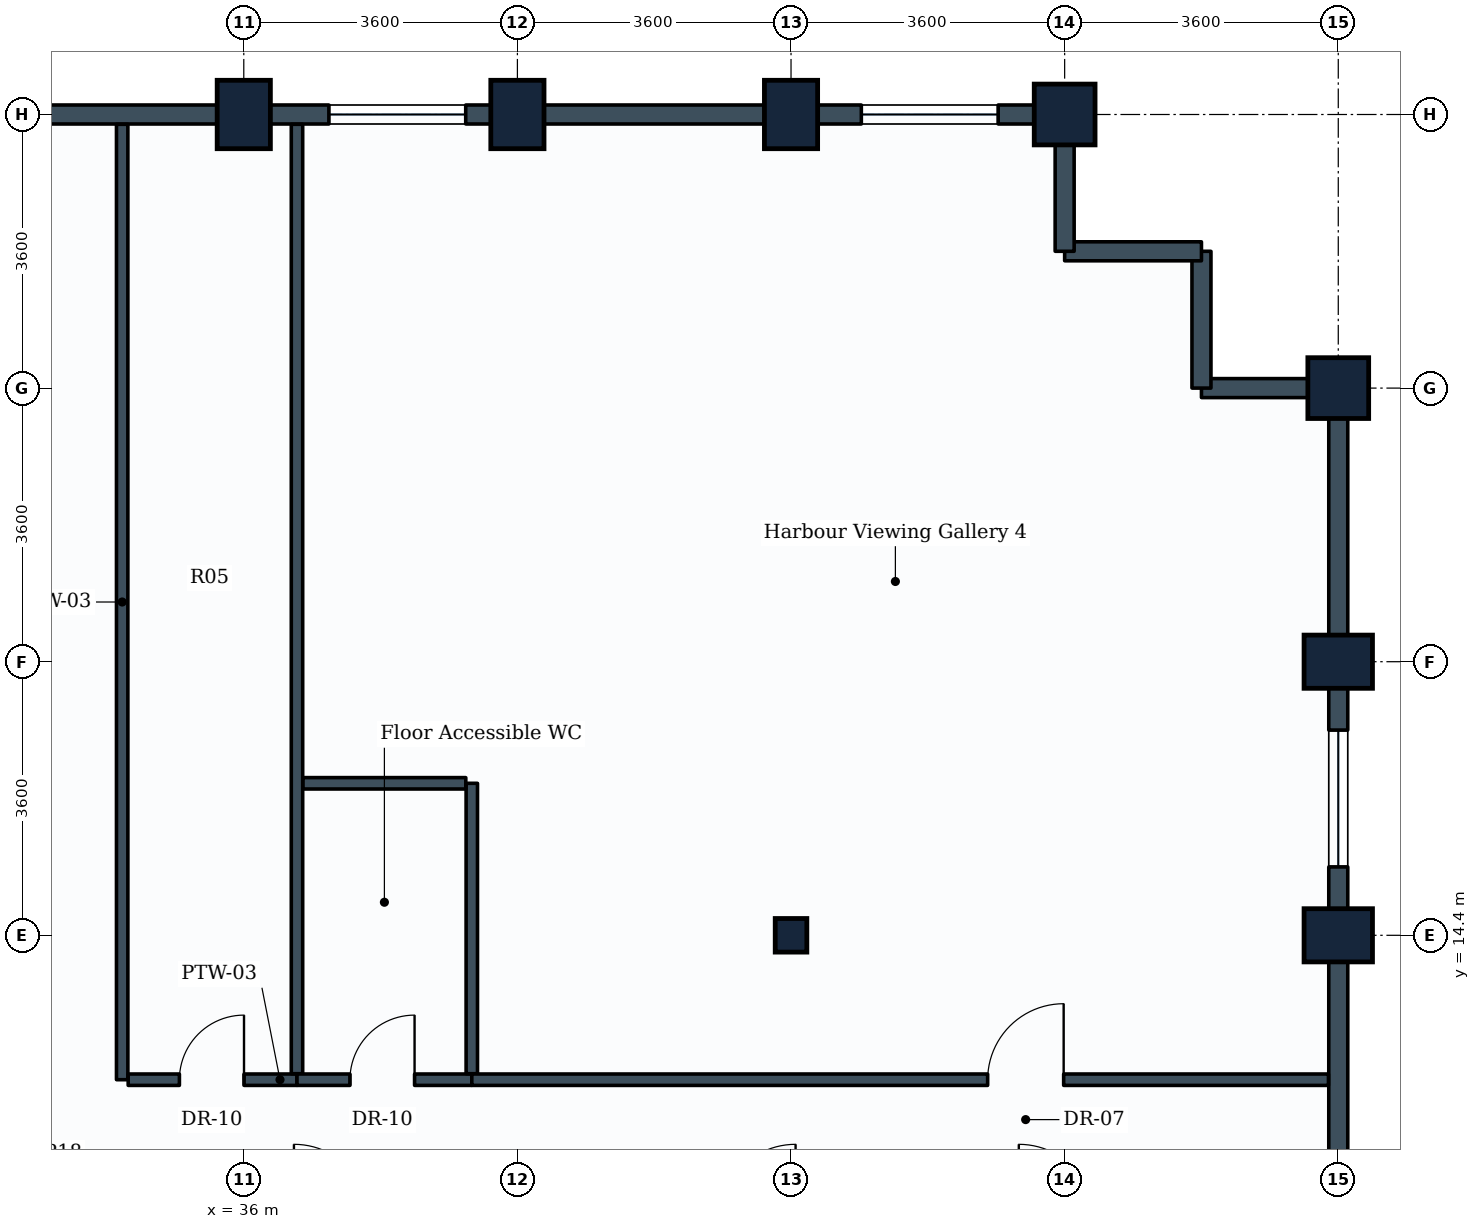
"""IFC4 building model, lengths in metres.
Left out: names, types, materials, properties, quantities, classifications, styles, units other than length and angle.
Written with IfcOpenShell. Run it as: python <this file> out.ifc"""

import sys

from ifc_helpers import new_model, si_unit, direction, frame, frame_2d, origin, origin_2d, place, context, subcontext, project, spatial, rectangle, i_section, extrude, element, fill, save


model = new_model("IFC4")
c1 = context("Model", 3, precision=1e-05, world=origin(), true_north=direction((0.0, 1.0)))
c2 = subcontext(c1, "Body", "Model", "MODEL_VIEW")
j1 = project(units=[si_unit("LENGTHUNIT", "METRE"), si_unit("PLANEANGLEUNIT", "RADIAN")], contexts=[c1])
p1 = place(None, origin())
s1 = spatial("IfcSite", under=j1, at=p1, CompositionType="ELEMENT")
p2 = place(p1, origin())
s2 = spatial("IfcBuilding", under=s1, at=p2, CompositionType="ELEMENT")
p3 = place(p2, frame((0.0, 0.0, 205.2)))
s3 = spatial("IfcBuildingStorey", under=s2, at=p3, CompositionType="ELEMENT", Elevation=205.2)
for number, where, z_axis, x_axis in (
    (1, (36.0, 25.2, 0.0), (0.0, 0.0, 1.0), (1.0, 0.0, 0.0)),
    (2, (39.6, 25.2, 0.0), (0.0, 0.0, 1.0), (1.0, 0.0, 0.0)),
):
    element("IfcColumn", number, at=place(p3, frame(where, z_axis=z_axis, x_axis=x_axis)), inside=s3, PredefinedType="COLUMN", context=c2, shape_type="SweptSolid", body=[
        extrude(rectangle(XDim=0.7, YDim=0.9, at=origin_2d()), origin(), (0.0, 0.0, 1.0), 3.8),
    ])
p4 = place(p3, frame((43.2, 14.4, 0.0), z_axis=(0.0, 0.0, 1.0), x_axis=(1.0, 0.0, 0.0)))
e3 = element("IfcColumn", 3, at=p4, inside=s3, PredefinedType="COLUMN", context=c2, shape_type="SweptSolid", body=[
    extrude(i_section(OverallWidth=0.416, OverallDepth=0.442, WebThickness=0.025, FlangeThickness=0.041, FilletRadius=0.015, at=origin_2d()), origin(), (0.0, 0.0, 1.0), 3.8),
])
p5 = place(p3, frame((43.2, 25.2, 0.0), z_axis=(0.0, 0.0, 1.0), x_axis=(1.0, 0.0, 0.0)))
e4 = element("IfcColumn", 4, at=p5, inside=s3, PredefinedType="COLUMN", context=c2, shape_type="SweptSolid", body=[
    extrude(rectangle(XDim=0.7, YDim=0.9, at=origin_2d()), origin(), (0.0, 0.0, 1.0), 3.8),
])
p6 = place(p3, frame((46.8, 25.2, 0.0), z_axis=(0.0, 0.0, 1.0), x_axis=(1.0, 0.0, 0.0)))
e5 = element("IfcColumn", 5, at=p6, inside=s3, PredefinedType="COLUMN", context=c2, shape_type="SweptSolid", body=[
    extrude(rectangle(XDim=0.8, YDim=0.8, at=origin_2d()), origin(), (0.0, 0.0, 1.0), 3.8),
])
for number, where, z_axis, x_axis in (
    (6, (50.4, 14.4, 0.0), (0.0, 0.0, 1.0), (0.0, 1.0, 0.0)),
    (7, (50.4, 18.0, 0.0), (0.0, 0.0, 1.0), (0.0, 1.0, 0.0)),
):
    element("IfcColumn", number, at=place(p3, frame(where, z_axis=z_axis, x_axis=x_axis)), inside=s3, PredefinedType="COLUMN", context=c2, shape_type="SweptSolid", body=[
        extrude(rectangle(XDim=0.7, YDim=0.9, at=origin_2d()), origin(), (0.0, 0.0, 1.0), 3.8),
    ])
p7 = place(p3, frame((50.4, 21.6, 0.0), z_axis=(0.0, 0.0, 1.0), x_axis=(0.0, 1.0, 0.0)))
e8 = element("IfcColumn", 8, at=p7, inside=s3, PredefinedType="COLUMN", context=c2, shape_type="SweptSolid", body=[
    extrude(rectangle(XDim=0.8, YDim=0.8, at=origin_2d()), origin(), (0.0, 0.0, 1.0), 3.8),
])
p8 = place(p3, frame((50.4, 14.4, 0.0), z_axis=(0.0, 0.0, 1.0), x_axis=(0.0, -1.0, 0.0)))
e9 = element("IfcWall", 9, at=p8, inside=s3, PredefinedType="STANDARD", context=c2, shape_type="SweptSolid", body=[
    extrude(rectangle(XDim=3.6, YDim=0.25, at=frame_2d((1.8, 0.0))), origin(), (0.0, 0.0, 1.0), 2.93),
])
p9 = place(p3, frame((50.4, 18.0, 0.0), z_axis=(0.0, 0.0, 1.0), x_axis=(0.0, -1.0, 0.0)))
e10 = element("IfcWall", 10, at=p9, inside=s3, PredefinedType="STANDARD", context=c2, shape_type="SweptSolid", body=[
    extrude(rectangle(XDim=3.6, YDim=0.25, at=frame_2d((1.8, 0.0))), origin(), (0.0, 0.0, 1.0), 2.93),
])
p10 = place(p9, frame((0.9, 0.0, 0.85)))
e11 = element("IfcOpeningElement", 11, at=p10, cuts=e10, PredefinedType="OPENING", context=c2, shape_type="SweptSolid", body=[
    extrude(rectangle(XDim=1.8, YDim=1.35, at=frame_2d((0.9, 0.675))), frame((0.0, 0.135, 0.0), z_axis=(0.0, -1.0, 0.0), x_axis=(1.0, 0.0, 0.0)), (0.0, 0.0, 1.0), 0.27),
])
p11 = place(p3, frame((50.4, 21.6, 0.0), z_axis=(0.0, 0.0, 1.0), x_axis=(0.0, -1.0, 0.0)))
e12 = element("IfcWall", 12, at=p11, inside=s3, PredefinedType="STANDARD", context=c2, shape_type="SweptSolid", body=[
    extrude(rectangle(XDim=3.6, YDim=0.25, at=frame_2d((1.8, 0.0))), origin(), (0.0, 0.0, 1.0), 2.93),
])
p12 = place(p3, frame((48.6, 21.6, 0.0), z_axis=(0.0, 0.0, 1.0), x_axis=(1.0, 0.0, 0.0)))
e13 = element("IfcWall", 13, at=p12, inside=s3, PredefinedType="STANDARD", context=c2, shape_type="SweptSolid", body=[
    extrude(rectangle(XDim=1.8, YDim=0.25, at=frame_2d((0.9, 0.0))), origin(), (0.0, 0.0, 1.0), 2.93),
])
p13 = place(p3, frame((48.6, 23.4, 0.0), z_axis=(0.0, 0.0, 1.0), x_axis=(0.0, -1.0, 0.0)))
e14 = element("IfcWall", 14, at=p13, inside=s3, PredefinedType="STANDARD", context=c2, shape_type="SweptSolid", body=[
    extrude(rectangle(XDim=1.8, YDim=0.25, at=frame_2d((0.9, 0.0))), origin(), (0.0, 0.0, 1.0), 3.465),
])
p14 = place(p3, frame((46.8, 23.4, 0.0), z_axis=(0.0, 0.0, 1.0), x_axis=(1.0, 0.0, 0.0)))
e15 = element("IfcWall", 15, at=p14, inside=s3, PredefinedType="STANDARD", context=c2, shape_type="SweptSolid", body=[
    extrude(rectangle(XDim=1.8, YDim=0.25, at=frame_2d((0.9, 0.0))), origin(), (0.0, 0.0, 1.0), 3.465),
])
p15 = place(p3, frame((46.8, 25.2, 0.0), z_axis=(0.0, 0.0, 1.0), x_axis=(0.0, -1.0, 0.0)))
e16 = element("IfcWall", 16, at=p15, inside=s3, PredefinedType="STANDARD", context=c2, shape_type="SweptSolid", body=[
    extrude(rectangle(XDim=1.8, YDim=0.25, at=frame_2d((0.9, 0.0))), origin(), (0.0, 0.0, 1.0), 2.93),
])
p16 = place(p3, frame((43.2, 25.2, 0.0), z_axis=(0.0, 0.0, 1.0), x_axis=(1.0, 0.0, 0.0)))
e17 = element("IfcWall", 17, at=p16, inside=s3, PredefinedType="STANDARD", context=c2, shape_type="SweptSolid", body=[
    extrude(rectangle(XDim=3.6, YDim=0.25, at=frame_2d((1.8, 0.0))), origin(), (0.0, 0.0, 1.0), 2.93),
])
p17 = place(p16, frame((0.925, 0.0, 0.85)))
e18 = element("IfcOpeningElement", 18, at=p17, cuts=e17, PredefinedType="OPENING", context=c2, shape_type="SweptSolid", body=[
    extrude(rectangle(XDim=1.8, YDim=1.35, at=frame_2d((0.9, 0.675))), frame((0.0, 0.135, 0.0), z_axis=(0.0, -1.0, 0.0), x_axis=(1.0, 0.0, 0.0)), (0.0, 0.0, 1.0), 0.27),
])
p18 = place(p3, frame((39.6, 25.2, 0.0), z_axis=(0.0, 0.0, 1.0), x_axis=(1.0, 0.0, 0.0)))
e19 = element("IfcWall", 19, at=p18, inside=s3, PredefinedType="STANDARD", context=c2, shape_type="SweptSolid", body=[
    extrude(rectangle(XDim=3.6, YDim=0.25, at=frame_2d((1.8, 0.0))), origin(), (0.0, 0.0, 1.0), 2.93),
])
p19 = place(p3, frame((36.0, 25.2, 0.0), z_axis=(0.0, 0.0, 1.0), x_axis=(1.0, 0.0, 0.0)))
e20 = element("IfcWall", 20, at=p19, inside=s3, PredefinedType="STANDARD", context=c2, shape_type="SweptSolid", body=[
    extrude(rectangle(XDim=3.6, YDim=0.25, at=frame_2d((1.8, 0.0))), origin(), (0.0, 0.0, 1.0), 2.93),
])
p20 = place(p19, frame((1.12, 0.0, 0.85)))
e21 = element("IfcOpeningElement", 21, at=p20, cuts=e20, PredefinedType="OPENING", context=c2, shape_type="SweptSolid", body=[
    extrude(rectangle(XDim=1.8, YDim=1.35, at=frame_2d((0.9, 0.675))), frame((0.0, 0.135, 0.0), z_axis=(0.0, -1.0, 0.0), x_axis=(1.0, 0.0, 0.0)), (0.0, 0.0, 1.0), 0.27),
])
p21 = place(p3, frame((32.4, 25.2, 0.0), z_axis=(0.0, 0.0, 1.0), x_axis=(1.0, 0.0, 0.0)))
e22 = element("IfcWall", 22, at=p21, inside=s3, PredefinedType="STANDARD", context=c2, shape_type="SweptSolid", body=[
    extrude(rectangle(XDim=3.6, YDim=0.25, at=frame_2d((1.8, 0.0))), origin(), (0.0, 0.0, 1.0), 2.93),
])
p22 = place(p3, frame((34.4, 12.5, 0.0), z_axis=(0.0, 0.0, 1.0), x_axis=(0.0, 1.0, 0.0)))
e23 = element("IfcWall", 23, at=p22, inside=s3, PredefinedType="PARTITIONING", context=c2, shape_type="SweptSolid", body=[
    extrude(rectangle(XDim=12.571, YDim=0.15, at=frame_2d((6.286, 0.0))), origin(), (0.0, 0.0, 1.0), 2.93),
])
p23 = place(p3, frame((34.479, 12.5, 0.0), z_axis=(0.0, 0.0, 1.0), x_axis=(1.0, 0.0, 0.0)))
e24 = element("IfcWall", 24, at=p23, inside=s3, PredefinedType="PARTITIONING", context=c2, shape_type="SweptSolid", body=[
    extrude(rectangle(XDim=2.221, YDim=0.15, at=frame_2d((1.11, 0.0))), origin(), (0.0, 0.0, 1.0), 3.19),
])
p24 = place(p23, frame((0.674, 0.0, 0.0)))
e25 = element("IfcOpeningElement", 25, at=p24, cuts=e24, PredefinedType="OPENING", context=c2, shape_type="SweptSolid", body=[
    extrude(rectangle(XDim=0.85, YDim=2.1, at=frame_2d((0.425, 1.05))), frame((0.0, 0.085, 0.0), z_axis=(0.0, -1.0, 0.0), x_axis=(1.0, 0.0, 0.0)), (0.0, 0.0, 1.0), 0.17),
])
p25 = place(p3, frame((36.7, 12.579, 0.0), z_axis=(0.0, 0.0, 1.0), x_axis=(0.0, 1.0, 0.0)))
e26 = element("IfcWall", 26, at=p25, inside=s3, PredefinedType="PARTITIONING", context=c2, shape_type="SweptSolid", body=[
    extrude(rectangle(XDim=12.492, YDim=0.15, at=frame_2d((6.246, 0.0))), origin(), (0.0, 0.0, 1.0), 2.93),
])
p26 = place(p3, frame((36.7, 12.5, 0.0), z_axis=(0.0, 0.0, 1.0), x_axis=(1.0, 0.0, 0.0)))
e27 = element("IfcWall", 27, at=p26, inside=s3, PredefinedType="PARTITIONING", context=c2, shape_type="SweptSolid", body=[
    extrude(rectangle(XDim=2.3, YDim=0.15, at=frame_2d((1.15, 0.0))), origin(), (0.0, 0.0, 1.0), 3.465),
])
p27 = place(p26, frame((0.697, 0.0, 0.0)))
e28 = element("IfcOpeningElement", 28, at=p27, cuts=e27, PredefinedType="OPENING", context=c2, shape_type="SweptSolid", body=[
    extrude(rectangle(XDim=0.85, YDim=2.1, at=frame_2d((0.425, 1.05))), frame((0.0, 0.085, 0.0), z_axis=(0.0, -1.0, 0.0), x_axis=(1.0, 0.0, 0.0)), (0.0, 0.0, 1.0), 0.17),
])
p28 = place(p3, frame((39.0, 12.579, 0.0), z_axis=(0.0, 0.0, 1.0), x_axis=(0.0, 1.0, 0.0)))
e29 = element("IfcWall", 29, at=p28, inside=s3, PredefinedType="PARTITIONING", context=c2, shape_type="SweptSolid", body=[
    extrude(rectangle(XDim=3.821, YDim=0.15, at=frame_2d((1.91, 0.0))), origin(), (0.0, 0.0, 1.0), 3.16),
])
p29 = place(p3, frame((36.779, 16.4, 0.0), z_axis=(0.0, 0.0, 1.0), x_axis=(1.0, 0.0, 0.0)))
e30 = element("IfcWall", 30, at=p29, inside=s3, PredefinedType="PARTITIONING", context=c2, shape_type="SweptSolid", body=[
    extrude(rectangle(XDim=2.142, YDim=0.15, at=frame_2d((1.071, 0.0))), origin(), (0.0, 0.0, 1.0), 3.465),
])
p30 = place(p3, frame((39.0, 12.5, 0.0), z_axis=(0.0, 0.0, 1.0), x_axis=(1.0, 0.0, 0.0)))
e31 = element("IfcWall", 31, at=p30, inside=s3, PredefinedType="PARTITIONING", context=c2, shape_type="SweptSolid", body=[
    extrude(rectangle(XDim=11.271, YDim=0.15, at=frame_2d((5.635, 0.0))), origin(), (0.0, 0.0, 1.0), 2.93),
])
p31 = place(p30, frame((6.787, 0.0, 0.0)))
e32 = element("IfcOpeningElement", 32, at=p31, cuts=e31, PredefinedType="OPENING", context=c2, shape_type="SweptSolid", body=[
    extrude(rectangle(XDim=1.0, YDim=2.1, at=frame_2d((0.5, 1.05))), frame((0.0, 0.085, 0.0), z_axis=(0.0, -1.0, 0.0), x_axis=(1.0, 0.0, 0.0)), (0.0, 0.0, 1.0), 0.17),
])
p32 = place(p10, origin())
e33 = element("IfcWindow", 33, at=p32, inside=s3, PartitioningType="SINGLE_PANEL", PredefinedType="WINDOW", context=c2, shape_type="SweptSolid", body=[
    extrude(rectangle(XDim=1.8, YDim=1.35, at=frame_2d((0.9, 0.675))), frame((0.0, 0.03, 0.0), z_axis=(0.0, -1.0, 0.0), x_axis=(1.0, 0.0, 0.0)), (0.0, 0.0, 1.0), 0.06),
])
fill(e11, e33)
p33 = place(p17, origin())
e34 = element("IfcWindow", 34, at=p33, inside=s3, PartitioningType="SINGLE_PANEL", PredefinedType="WINDOW", context=c2, shape_type="SweptSolid", body=[
    extrude(rectangle(XDim=1.8, YDim=1.35, at=frame_2d((0.9, 0.675))), frame((0.0, 0.03, 0.0), z_axis=(0.0, -1.0, 0.0), x_axis=(1.0, 0.0, 0.0)), (0.0, 0.0, 1.0), 0.06),
])
fill(e18, e34)
p34 = place(p20, origin())
e35 = element("IfcWindow", 35, at=p34, inside=s3, PartitioningType="SINGLE_PANEL", PredefinedType="WINDOW", context=c2, shape_type="SweptSolid", body=[
    extrude(rectangle(XDim=1.8, YDim=1.35, at=frame_2d((0.9, 0.675))), frame((0.0, 0.03, 0.0), z_axis=(0.0, -1.0, 0.0), x_axis=(1.0, 0.0, 0.0)), (0.0, 0.0, 1.0), 0.06),
])
fill(e21, e35)
p35 = place(p24, origin())
e36 = element("IfcDoor", 36, at=p35, inside=s3, OperationType="SINGLE_SWING_RIGHT", PredefinedType="DOOR", context=c2, shape_type="SweptSolid", body=[
    extrude(rectangle(XDim=0.85, YDim=2.1, at=frame_2d((0.425, 1.05))), frame((0.0, 0.025, 0.0), z_axis=(0.0, -1.0, 0.0), x_axis=(1.0, 0.0, 0.0)), (0.0, 0.0, 1.0), 0.05),
])
fill(e25, e36)
p36 = place(p27, origin())
e37 = element("IfcDoor", 37, at=p36, inside=s3, OperationType="SINGLE_SWING_RIGHT", PredefinedType="DOOR", context=c2, shape_type="SweptSolid", body=[
    extrude(rectangle(XDim=0.85, YDim=2.1, at=frame_2d((0.425, 1.05))), frame((0.0, 0.025, 0.0), z_axis=(0.0, -1.0, 0.0), x_axis=(1.0, 0.0, 0.0)), (0.0, 0.0, 1.0), 0.05),
])
fill(e28, e37)
p37 = place(p31, origin())
e38 = element("IfcDoor", 38, at=p37, inside=s3, OperationType="SINGLE_SWING_RIGHT", PredefinedType="DOOR", context=c2, shape_type="SweptSolid", body=[
    extrude(rectangle(XDim=1.0, YDim=2.1, at=frame_2d((0.5, 1.05))), frame((0.0, 0.025, 0.0), z_axis=(0.0, -1.0, 0.0), x_axis=(1.0, 0.0, 0.0)), (0.0, 0.0, 1.0), 0.05),
])
fill(e32, e38)
save(model, sys.argv[1])
